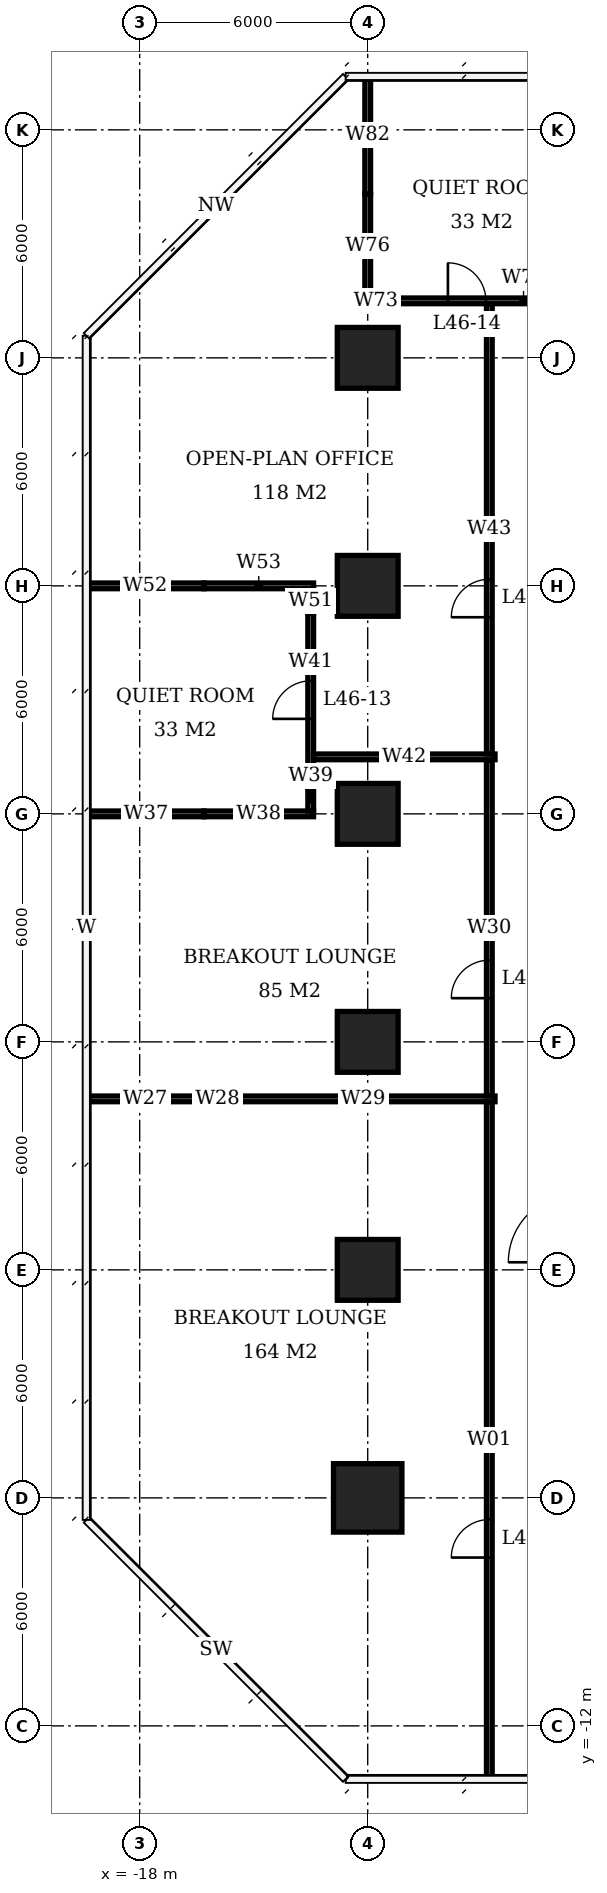
"""IFC4 building model, lengths in metres.
Left out: names, types, materials, properties, quantities, classifications, styles, units other than length and angle.
Written with IfcOpenShell. Run it as: python <this file> out.ifc"""

import sys

from ifc_helpers import new_model, si_unit, direction, frame, frame_2d, origin, origin_2d, place, context, subcontext, project, spatial, rectangle, extrude, element, fill, save


model = new_model("IFC4")
c1 = context("Model", 3, precision=1e-05, world=origin(), true_north=direction((0.0, 1.0)))
c2 = subcontext(c1, "Body", "Model", "MODEL_VIEW")
j1 = project(units=[si_unit("LENGTHUNIT", "METRE"), si_unit("PLANEANGLEUNIT", "RADIAN")], contexts=[c1])
p1 = place(None, origin())
s1 = spatial("IfcSite", under=j1, at=p1, CompositionType="ELEMENT")
p2 = place(p1, origin())
s2 = spatial("IfcBuilding", under=s1, at=p2, CompositionType="ELEMENT")
p3 = place(p2, frame((0.0, 0.0, 188.9)))
s3 = spatial("IfcBuildingStorey", under=s2, at=p3, CompositionType="ELEMENT", Elevation=188.9)
p4 = place(p3, frame((-12.0, -6.0, 0.0), z_axis=(0.0, 0.0, 1.0), x_axis=(1.0, 0.0, 0.0)))
e1 = element("IfcColumn", 1, at=p4, inside=s3, PredefinedType="COLUMN", context=c2, shape_type="SweptSolid", body=[
    extrude(rectangle(XDim=1.8, YDim=1.8, at=origin_2d()), origin(), (0.0, 0.0, 1.0), 3.9),
])
for number, where, z_axis, x_axis in (
    (2, (-12.0, 0.0, 0.0), (0.0, 0.0, 1.0), (1.0, 0.0, 0.0)),
    (3, (-12.0, 6.0, 0.0), (0.0, 0.0, 1.0), (1.0, 0.0, 0.0)),
    (4, (-12.0, 12.0, 0.0), (0.0, 0.0, 1.0), (1.0, 0.0, 0.0)),
    (5, (-12.0, 18.0, 0.0), (0.0, 0.0, 1.0), (1.0, 0.0, 0.0)),
    (6, (-12.0, 24.0, 0.0), (0.0, 0.0, 1.0), (1.0, 0.0, 0.0)),
):
    element("IfcColumn", number, at=place(p3, frame(where, z_axis=z_axis, x_axis=x_axis)), inside=s3, PredefinedType="COLUMN", context=c2, shape_type="SweptSolid", body=[
        extrude(rectangle(XDim=1.6, YDim=1.6, at=origin_2d()), origin(), (0.0, 0.0, 1.0), 3.9),
    ])
p5 = place(p3, frame((-19.35, 12.0, 0.0), z_axis=(0.0, 0.0, 1.0), x_axis=(1.0, 0.0, 0.0)))
e7 = element("IfcWall", 7, at=p5, inside=s3, PredefinedType="PARTITIONING", context=c2, shape_type="SweptSolid", body=[
    extrude(rectangle(XDim=3.04, YDim=0.15, at=frame_2d((1.52, 0.0))), origin(), (0.0, 0.0, 1.0), 3.65),
])
p6 = place(p3, frame((-16.31, 12.0, 0.0), z_axis=(0.0, 0.0, 1.0), x_axis=(1.0, 0.0, 0.0)))
e8 = element("IfcWall", 8, at=p6, inside=s3, PredefinedType="PARTITIONING", context=c2, shape_type="SweptSolid", body=[
    extrude(rectangle(XDim=2.885, YDim=0.15, at=frame_2d((1.442, 0.0))), origin(), (0.0, 0.0, 1.0), 2.65),
])
p7 = place(p3, frame((-19.4, 18.0, 0.0), z_axis=(0.0, 0.0, 1.0), x_axis=(1.0, 0.0, 0.0)))
e9 = element("IfcWall", 9, at=p7, inside=s3, PredefinedType="PARTITIONING", context=c2, shape_type="SweptSolid", body=[
    extrude(rectangle(XDim=3.09, YDim=0.15, at=frame_2d((1.545, 0.0))), origin(), (0.0, 0.0, 1.0), 3.65),
])
p8 = place(p3, frame((-16.31, 18.0, 0.0), z_axis=(0.0, 0.0, 1.0), x_axis=(1.0, 0.0, 0.0)))
e10 = element("IfcWall", 10, at=p8, inside=s3, PredefinedType="PARTITIONING", context=c2, shape_type="SweptSolid", body=[
    extrude(rectangle(XDim=2.885, YDim=0.15, at=frame_2d((1.442, 0.0))), origin(), (0.0, 0.0, 1.0), 2.65),
])
p9 = place(p3, frame((-12.075, 25.5, 0.0), z_axis=(0.0, 0.0, 1.0), x_axis=(1.0, 0.0, 0.0)))
e11 = element("IfcWall", 11, at=p9, inside=s3, PredefinedType="PARTITIONING", context=c2, shape_type="SweptSolid", body=[
    extrude(rectangle(XDim=0.585, YDim=0.15, at=frame_2d((0.292, 0.0))), origin(), (0.0, 0.0, 1.0), 2.65),
])
p10 = place(p3, frame((-11.49, 25.5, 0.0), z_axis=(0.0, 0.0, 1.0), x_axis=(1.0, 0.0, 0.0)))
e12 = element("IfcWall", 12, at=p10, inside=s3, PredefinedType="PARTITIONING", context=c2, shape_type="SweptSolid", body=[
    extrude(rectangle(XDim=4.78, YDim=0.15, at=frame_2d((2.39, 0.0))), origin(), (0.0, 0.0, 1.0), 3.65),
])
p11 = place(p10, frame((1.6, 0.0, 0.0)))
e13 = element("IfcOpeningElement", 13, at=p11, cuts=e12, PredefinedType="OPENING", context=c2, shape_type="SweptSolid", body=[
    extrude(rectangle(XDim=1.0, YDim=2.1, at=frame_2d((0.5, 1.05))), frame((0.0, 0.085, 0.0), z_axis=(0.0, -1.0, 0.0), x_axis=(1.0, 0.0, 0.0)), (0.0, 0.0, 1.0), 0.17),
])
p12 = place(p3, frame((-13.5, 12.075, 0.0), z_axis=(0.0, 0.0, 1.0), x_axis=(0.0, 1.0, 0.0)))
e14 = element("IfcWall", 14, at=p12, inside=s3, PredefinedType="PARTITIONING", context=c2, shape_type="SweptSolid", body=[
    extrude(rectangle(XDim=0.635, YDim=0.15, at=frame_2d((0.317, 0.0))), origin(), (0.0, 0.0, 1.0), 2.65),
])
p13 = place(p3, frame((-13.5, 12.71, 0.0), z_axis=(0.0, 0.0, 1.0), x_axis=(0.0, 1.0, 0.0)))
e15 = element("IfcWall", 15, at=p13, inside=s3, PredefinedType="PARTITIONING", context=c2, shape_type="SweptSolid", body=[
    extrude(rectangle(XDim=4.58, YDim=0.15, at=frame_2d((2.29, 0.0))), origin(), (0.0, 0.0, 1.0), 3.65),
])
p14 = place(p13, frame((1.79, 0.0, 0.0)))
e16 = element("IfcOpeningElement", 16, at=p14, cuts=e15, PredefinedType="OPENING", context=c2, shape_type="SweptSolid", body=[
    extrude(rectangle(XDim=1.0, YDim=2.1, at=frame_2d((0.5, 1.05))), frame((0.0, 0.085, 0.0), z_axis=(0.0, -1.0, 0.0), x_axis=(1.0, 0.0, 0.0)), (0.0, 0.0, 1.0), 0.17),
])
p15 = place(p3, frame((-13.5, 17.29, 0.0), z_axis=(0.0, 0.0, 1.0), x_axis=(0.0, 1.0, 0.0)))
e17 = element("IfcWall", 17, at=p15, inside=s3, PredefinedType="PARTITIONING", context=c2, shape_type="SweptSolid", body=[
    extrude(rectangle(XDim=0.635, YDim=0.15, at=frame_2d((0.317, 0.0))), origin(), (0.0, 0.0, 1.0), 2.65),
])
p16 = place(p3, frame((-12.0, 25.575, 0.0), z_axis=(0.0, 0.0, 1.0), x_axis=(0.0, 1.0, 0.0)))
e18 = element("IfcWall", 18, at=p16, inside=s3, PredefinedType="PARTITIONING", context=c2, shape_type="SweptSolid", body=[
    extrude(rectangle(XDim=2.735, YDim=0.15, at=frame_2d((1.368, 0.0))), origin(), (0.0, 0.0, 1.0), 2.65),
])
for number, where, z_axis, x_axis in (
    (19, (-12.0, 28.31, 0.0), (0.0, 0.0, 1.0), (0.0, 1.0, 0.0)),
    (20, (-19.4, 4.5, 0.0), (0.0, 0.0, 1.0), (1.0, 0.0, 0.0)),
):
    element("IfcWall", number, at=place(p3, frame(where, z_axis=z_axis, x_axis=x_axis)), inside=s3, PredefinedType="PARTITIONING", context=c2, shape_type="SweptSolid", body=[
        extrude(rectangle(XDim=3.09, YDim=0.15, at=frame_2d((1.545, 0.0))), origin(), (0.0, 0.0, 1.0), 3.65),
    ])
p17 = place(p3, frame((-16.31, 4.5, 0.0), z_axis=(0.0, 0.0, 1.0), x_axis=(1.0, 0.0, 0.0)))
e21 = element("IfcWall", 21, at=p17, inside=s3, PredefinedType="PARTITIONING", context=c2, shape_type="SweptSolid", body=[
    extrude(rectangle(XDim=0.72, YDim=0.15, at=frame_2d((0.36, 0.0))), origin(), (0.0, 0.0, 1.0), 2.65),
])
p18 = place(p3, frame((-15.59, 4.5, 0.0), z_axis=(0.0, 0.0, 1.0), x_axis=(1.0, 0.0, 0.0)))
e22 = element("IfcWall", 22, at=p18, inside=s3, PredefinedType="PARTITIONING", context=c2, shape_type="SweptSolid", body=[
    extrude(rectangle(XDim=6.94, YDim=0.15, at=frame_2d((3.47, 0.0))), origin(), (0.0, 0.0, 1.0), 3.65),
])
p19 = place(p3, frame((-13.425, 13.5, 0.0), z_axis=(0.0, 0.0, 1.0), x_axis=(1.0, 0.0, 0.0)))
e23 = element("IfcWall", 23, at=p19, inside=s3, PredefinedType="PARTITIONING", context=c2, shape_type="SweptSolid", body=[
    extrude(rectangle(XDim=4.775, YDim=0.15, at=frame_2d((2.388, 0.0))), origin(), (0.0, 0.0, 1.0), 3.65),
])
p20 = place(p3, frame((-8.8, -13.4, 0.0), z_axis=(0.0, 0.0, 1.0), x_axis=(0.0, 1.0, 0.0)))
e24 = element("IfcWall", 24, at=p20, inside=s3, PredefinedType="PARTITIONING", context=c2, shape_type="SweptSolid", body=[
    extrude(rectangle(XDim=17.825, YDim=0.15, at=frame_2d((8.913, 0.0))), origin(), (0.0, 0.0, 1.0), 3.65),
])
p21 = place(p20, frame((5.83, 0.0, 0.0)))
e25 = element("IfcOpeningElement", 25, at=p21, cuts=e24, PredefinedType="OPENING", context=c2, shape_type="SweptSolid", body=[
    extrude(rectangle(XDim=1.0, YDim=2.1, at=frame_2d((0.5, 1.05))), frame((0.0, 0.085, 0.0), z_axis=(0.0, -1.0, 0.0), x_axis=(1.0, 0.0, 0.0)), (0.0, 0.0, 1.0), 0.17),
])
p22 = place(p3, frame((-8.8, 4.575, 0.0), z_axis=(0.0, 0.0, 1.0), x_axis=(0.0, 1.0, 0.0)))
e26 = element("IfcWall", 26, at=p22, inside=s3, PredefinedType="PARTITIONING", context=c2, shape_type="SweptSolid", body=[
    extrude(rectangle(XDim=8.85, YDim=0.15, at=frame_2d((4.425, 0.0))), origin(), (0.0, 0.0, 1.0), 3.65),
])
p23 = place(p22, frame((2.575, 0.0, 0.0)))
e27 = element("IfcOpeningElement", 27, at=p23, cuts=e26, PredefinedType="OPENING", context=c2, shape_type="SweptSolid", body=[
    extrude(rectangle(XDim=1.0, YDim=2.1, at=frame_2d((0.5, 1.05))), frame((0.0, 0.085, 0.0), z_axis=(0.0, -1.0, 0.0), x_axis=(1.0, 0.0, 0.0)), (0.0, 0.0, 1.0), 0.17),
])
p24 = place(p3, frame((-8.8, 13.575, 0.0), z_axis=(0.0, 0.0, 1.0), x_axis=(0.0, 1.0, 0.0)))
e28 = element("IfcWall", 28, at=p24, inside=s3, PredefinedType="PARTITIONING", context=c2, shape_type="SweptSolid", body=[
    extrude(rectangle(XDim=11.85, YDim=0.15, at=frame_2d((5.925, 0.0))), origin(), (0.0, 0.0, 1.0), 3.65),
])
p25 = place(p24, frame((3.599, 0.0, 0.0)))
e29 = element("IfcOpeningElement", 29, at=p25, cuts=e28, PredefinedType="OPENING", context=c2, shape_type="SweptSolid", body=[
    extrude(rectangle(XDim=1.0, YDim=2.1, at=frame_2d((0.5, 1.05))), frame((0.0, 0.085, 0.0), z_axis=(0.0, -1.0, 0.0), x_axis=(1.0, 0.0, 0.0)), (0.0, 0.0, 1.0), 0.17),
])
p26 = place(p14, origin())
e30 = element("IfcDoor", 30, at=p26, inside=s3, OperationType="SINGLE_SWING_LEFT", PredefinedType="DOOR", context=c2, shape_type="SweptSolid", body=[
    extrude(rectangle(XDim=1.0, YDim=2.1, at=frame_2d((0.5, 1.05))), frame((0.0, 0.025, 0.0), z_axis=(0.0, -1.0, 0.0), x_axis=(1.0, 0.0, 0.0)), (0.0, 0.0, 1.0), 0.05),
])
fill(e16, e30)
p27 = place(p11, origin())
e31 = element("IfcDoor", 31, at=p27, inside=s3, OperationType="SINGLE_SWING_LEFT", PredefinedType="DOOR", context=c2, shape_type="SweptSolid", body=[
    extrude(rectangle(XDim=1.0, YDim=2.1, at=frame_2d((0.5, 1.05))), frame((0.0, 0.025, 0.0), z_axis=(0.0, -1.0, 0.0), x_axis=(1.0, 0.0, 0.0)), (0.0, 0.0, 1.0), 0.05),
])
fill(e13, e31)
p28 = place(p21, origin())
e32 = element("IfcDoor", 32, at=p28, inside=s3, OperationType="SINGLE_SWING_LEFT", PredefinedType="DOOR", context=c2, shape_type="SweptSolid", body=[
    extrude(rectangle(XDim=1.0, YDim=2.1, at=frame_2d((0.5, 1.05))), frame((0.0, 0.025, 0.0), z_axis=(0.0, -1.0, 0.0), x_axis=(1.0, 0.0, 0.0)), (0.0, 0.0, 1.0), 0.05),
])
fill(e25, e32)
p29 = place(p23, origin())
e33 = element("IfcDoor", 33, at=p29, inside=s3, OperationType="SINGLE_SWING_LEFT", PredefinedType="DOOR", context=c2, shape_type="SweptSolid", body=[
    extrude(rectangle(XDim=1.0, YDim=2.1, at=frame_2d((0.5, 1.05))), frame((0.0, 0.025, 0.0), z_axis=(0.0, -1.0, 0.0), x_axis=(1.0, 0.0, 0.0)), (0.0, 0.0, 1.0), 0.05),
])
fill(e27, e33)
p30 = place(p25, origin())
e34 = element("IfcDoor", 34, at=p30, inside=s3, OperationType="SINGLE_SWING_LEFT", PredefinedType="DOOR", context=c2, shape_type="SweptSolid", body=[
    extrude(rectangle(XDim=1.0, YDim=2.1, at=frame_2d((0.5, 1.05))), frame((0.0, 0.025, 0.0), z_axis=(0.0, -1.0, 0.0), x_axis=(1.0, 0.0, 0.0)), (0.0, 0.0, 1.0), 0.05),
])
fill(e29, e34)
save(model, sys.argv[1])
